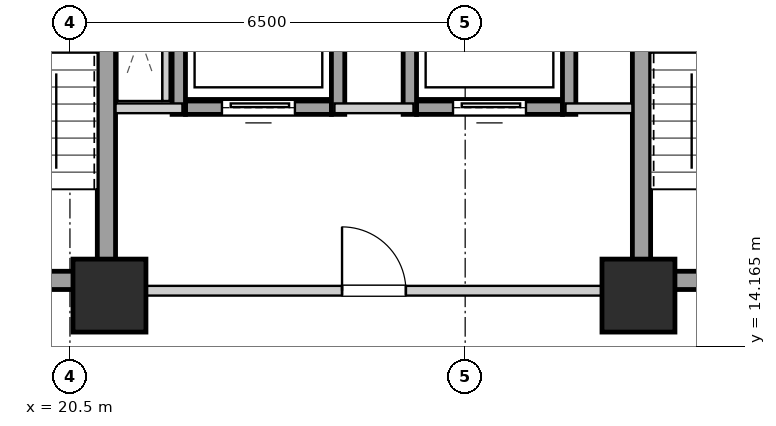
"""IFC4 building model, lengths in metres.
Left out: names, types, materials, properties, quantities, classifications, styles, units other than length and angle.
Written with IfcOpenShell. Run it as: python <this file> out.ifc"""

import sys

from ifc_helpers import new_model, si_unit, direction, frame, frame_2d, origin, origin_2d, place, context, subcontext, project, spatial, rectangle, extrude, element, fill, save


model = new_model("IFC4")
c1 = context("Model", 3, precision=1e-05, world=origin(), true_north=direction((0.0, 1.0)))
c2 = subcontext(c1, "Body", "Model", "MODEL_VIEW")
j1 = project(units=[si_unit("LENGTHUNIT", "METRE"), si_unit("PLANEANGLEUNIT", "RADIAN")], contexts=[c1])
p1 = place(None, origin())
s1 = spatial("IfcSite", under=j1, at=p1, CompositionType="ELEMENT")
p2 = place(p1, origin())
s2 = spatial("IfcBuilding", under=s1, at=p2, CompositionType="ELEMENT")
p3 = place(p2, frame((0.0, 0.0, 25.8)))
s3 = spatial("IfcBuildingStorey", under=s2, at=p3, CompositionType="ELEMENT", Elevation=25.8)
for number, where, z_axis, x_axis in (
    (1, (21.15, 15.0, 0.0), (0.0, 0.0, 1.0), (1.0, 0.0, 0.0)),
    (2, (29.85, 15.0, 0.0), (0.0, 0.0, 1.0), (1.0, 0.0, 0.0)),
):
    element("IfcColumn", number, at=place(p3, frame(where, z_axis=z_axis, x_axis=x_axis)), inside=s3, PredefinedType="COLUMN", context=c2, shape_type="SweptSolid", body=[
        extrude(rectangle(XDim=1.2, YDim=1.2, at=origin_2d()), origin(), (0.0, 0.0, 1.0), 3.2),
    ])
p4 = place(p3, frame((21.1, 15.1, 0.0), z_axis=(0.0, 0.0, 1.0), x_axis=(0.0, 1.0, 0.0)))
e3 = element("IfcWall", 3, at=p4, inside=s3, PredefinedType="SHEAR", context=c2, shape_type="SweptSolid", body=[
    extrude(rectangle(XDim=9.0, YDim=0.3, at=frame_2d((4.5, 0.0))), origin(), (0.0, 0.0, 1.0), 2.94),
])
p5 = place(p3, frame((18.1, 15.25, 0.0), z_axis=(0.0, 0.0, 1.0), x_axis=(1.0, 0.0, 0.0)))
e4 = element("IfcWall", 4, at=p5, inside=s3, PredefinedType="SHEAR", context=c2, shape_type="SweptSolid", body=[
    extrude(rectangle(XDim=2.85, YDim=0.3, at=frame_2d((1.425, 0.0))), origin(), (0.0, 0.0, 1.0), 2.94),
])
p6 = place(p5, frame((0.86, 0.0, 0.0)))
e5 = element("IfcOpeningElement", 5, at=p6, cuts=e4, PredefinedType="OPENING", context=c2, shape_type="SweptSolid", body=[
    extrude(rectangle(XDim=1.1, YDim=2.05, at=frame_2d((0.55, 1.025))), frame((0.0, 0.16, 0.0), z_axis=(0.0, -1.0, 0.0), x_axis=(1.0, 0.0, 0.0)), (0.0, 0.0, 1.0), 0.32),
])
p7 = place(p3, frame((29.9, 15.1, 0.0), z_axis=(0.0, 0.0, 1.0), x_axis=(0.0, 1.0, 0.0)))
e6 = element("IfcWall", 6, at=p7, inside=s3, PredefinedType="SHEAR", context=c2, shape_type="SweptSolid", body=[
    extrude(rectangle(XDim=9.0, YDim=0.3, at=frame_2d((4.5, 0.0))), origin(), (0.0, 0.0, 1.0), 2.94),
])
p8 = place(p3, frame((30.05, 15.25, 0.0), z_axis=(0.0, 0.0, 1.0), x_axis=(1.0, 0.0, 0.0)))
e7 = element("IfcWall", 7, at=p8, inside=s3, PredefinedType="SHEAR", context=c2, shape_type="SweptSolid", body=[
    extrude(rectangle(XDim=2.85, YDim=0.3, at=frame_2d((1.425, 0.0))), origin(), (0.0, 0.0, 1.0), 2.94),
])
p9 = place(p8, frame((0.86, 0.0, 0.0)))
e8 = element("IfcOpeningElement", 8, at=p9, cuts=e7, PredefinedType="OPENING", context=c2, shape_type="SweptSolid", body=[
    extrude(rectangle(XDim=1.1, YDim=2.05, at=frame_2d((0.55, 1.025))), frame((0.0, 0.16, 0.0), z_axis=(0.0, -1.0, 0.0), x_axis=(1.0, 0.0, 0.0)), (0.0, 0.0, 1.0), 0.32),
])
p10 = place(p3, frame((22.4, 18.09, 0.0), z_axis=(0.0, 0.0, 1.0), x_axis=(1.0, 0.0, 0.0)))
e9 = element("IfcWall", 9, at=p10, inside=s3, PredefinedType="SHEAR", context=c2, shape_type="SweptSolid", body=[
    extrude(rectangle(XDim=2.4, YDim=0.22, at=frame_2d((1.2, 0.0))), origin(), (0.0, 0.0, 1.0), 2.94),
])
p11 = place(p10, frame((0.6, 0.0, 0.0)))
e10 = element("IfcOpeningElement", 10, at=p11, cuts=e9, PredefinedType="OPENING", context=c2, shape_type="SweptSolid", body=[
    extrude(rectangle(XDim=1.2, YDim=2.15, at=frame_2d((0.6, 1.075))), frame((0.0, 0.12, 0.0), z_axis=(0.0, -1.0, 0.0), x_axis=(1.0, 0.0, 0.0)), (0.0, 0.0, 1.0), 0.24),
])
for number, where, z_axis, x_axis in (
    (11, (22.29, 17.98, 0.0), (0.0, 0.0, 1.0), (0.0, 1.0, 0.0)),
    (12, (24.91, 17.98, 0.0), (0.0, 0.0, 1.0), (0.0, 1.0, 0.0)),
):
    element("IfcWall", number, at=place(p3, frame(where, z_axis=z_axis, x_axis=x_axis)), inside=s3, PredefinedType="SHEAR", context=c2, shape_type="SweptSolid", body=[
        extrude(rectangle(XDim=2.54, YDim=0.22, at=frame_2d((1.27, 0.0))), origin(), (0.0, 0.0, 1.0), 2.94),
    ])
p12 = place(p3, frame((26.2, 18.09, 0.0), z_axis=(0.0, 0.0, 1.0), x_axis=(1.0, 0.0, 0.0)))
e13 = element("IfcWall", 13, at=p12, inside=s3, PredefinedType="SHEAR", context=c2, shape_type="SweptSolid", body=[
    extrude(rectangle(XDim=2.4, YDim=0.22, at=frame_2d((1.2, 0.0))), origin(), (0.0, 0.0, 1.0), 2.94),
])
p13 = place(p12, frame((0.6, 0.0, 0.0)))
e14 = element("IfcOpeningElement", 14, at=p13, cuts=e13, PredefinedType="OPENING", context=c2, shape_type="SweptSolid", body=[
    extrude(rectangle(XDim=1.2, YDim=2.15, at=frame_2d((0.6, 1.075))), frame((0.0, 0.12, 0.0), z_axis=(0.0, -1.0, 0.0), x_axis=(1.0, 0.0, 0.0)), (0.0, 0.0, 1.0), 0.24),
])
for number, where, z_axis, x_axis in (
    (15, (26.09, 17.98, 0.0), (0.0, 0.0, 1.0), (0.0, 1.0, 0.0)),
    (16, (28.71, 17.98, 0.0), (0.0, 0.0, 1.0), (0.0, 1.0, 0.0)),
):
    element("IfcWall", number, at=place(p3, frame(where, z_axis=z_axis, x_axis=x_axis)), inside=s3, PredefinedType="SHEAR", context=c2, shape_type="SweptSolid", body=[
        extrude(rectangle(XDim=2.54, YDim=0.22, at=frame_2d((1.27, 0.0))), origin(), (0.0, 0.0, 1.0), 2.94),
    ])
p14 = place(p3, frame((21.25, 15.08, 0.0), z_axis=(0.0, 0.0, 1.0), x_axis=(1.0, 0.0, 0.0)))
e17 = element("IfcWall", 17, at=p14, inside=s3, PredefinedType="PARTITIONING", context=c2, shape_type="SweptSolid", body=[
    extrude(rectangle(XDim=8.5, YDim=0.16, at=frame_2d((4.25, 0.0))), origin(), (0.0, 0.0, 1.0), 2.155),
])
p15 = place(p14, frame((3.725, 0.0, 0.0)))
e18 = element("IfcOpeningElement", 18, at=p15, cuts=e17, PredefinedType="OPENING", context=c2, shape_type="SweptSolid", body=[
    extrude(rectangle(XDim=1.05, YDim=2.05, at=frame_2d((0.525, 1.025))), frame((0.0, 0.09, 0.0), z_axis=(0.0, -1.0, 0.0), x_axis=(1.0, 0.0, 0.0)), (0.0, 0.0, 1.0), 0.18),
])
p16 = place(p3, frame((21.25, 18.08, 0.0), z_axis=(0.0, 0.0, 1.0), x_axis=(1.0, 0.0, 0.0)))
e19 = element("IfcWall", 19, at=p16, inside=s3, PredefinedType="PARTITIONING", context=c2, shape_type="SweptSolid", body=[
    extrude(rectangle(XDim=1.1, YDim=0.16, at=frame_2d((0.55, 0.0))), origin(), (0.0, 0.0, 1.0), 2.94),
])
p17 = place(p3, frame((24.85, 18.08, 0.0), z_axis=(0.0, 0.0, 1.0), x_axis=(1.0, 0.0, 0.0)))
e20 = element("IfcWall", 20, at=p17, inside=s3, PredefinedType="PARTITIONING", context=c2, shape_type="SweptSolid", body=[
    extrude(rectangle(XDim=1.3, YDim=0.16, at=frame_2d((0.65, 0.0))), origin(), (0.0, 0.0, 1.0), 2.94),
])
p18 = place(p3, frame((28.65, 18.08, 0.0), z_axis=(0.0, 0.0, 1.0), x_axis=(1.0, 0.0, 0.0)))
e21 = element("IfcWall", 21, at=p18, inside=s3, PredefinedType="PARTITIONING", context=c2, shape_type="SweptSolid", body=[
    extrude(rectangle(XDim=1.1, YDim=0.16, at=frame_2d((0.55, 0.0))), origin(), (0.0, 0.0, 1.0), 2.94),
])
p19 = place(p3, frame((22.08, 18.2, 0.0), z_axis=(0.0, 0.0, 1.0), x_axis=(0.0, 1.0, 0.0)))
e22 = element("IfcWall", 22, at=p19, inside=s3, PredefinedType="PARTITIONING", context=c2, shape_type="SweptSolid", body=[
    extrude(rectangle(XDim=2.12, YDim=0.12, at=frame_2d((1.06, 0.0))), origin(), (0.0, 0.0, 1.0), 2.94),
])
p20 = place(p11, origin())
e23 = element("IfcDoor", 23, at=p20, inside=s3, OperationType="SLIDING_TO_LEFT", PredefinedType="DOOR", context=c2, shape_type="SweptSolid", body=[
    extrude(rectangle(XDim=1.2, YDim=2.15, at=frame_2d((0.6, 1.075))), frame((0.0, 0.025, 0.0), z_axis=(0.0, -1.0, 0.0), x_axis=(1.0, 0.0, 0.0)), (0.0, 0.0, 1.0), 0.05),
])
fill(e10, e23)
p21 = place(p13, origin())
e24 = element("IfcDoor", 24, at=p21, inside=s3, OperationType="SLIDING_TO_LEFT", PredefinedType="DOOR", context=c2, shape_type="SweptSolid", body=[
    extrude(rectangle(XDim=1.2, YDim=2.15, at=frame_2d((0.6, 1.075))), frame((0.0, 0.025, 0.0), z_axis=(0.0, -1.0, 0.0), x_axis=(1.0, 0.0, 0.0)), (0.0, 0.0, 1.0), 0.05),
])
fill(e14, e24)
p22 = place(p15, origin())
e25 = element("IfcDoor", 25, at=p22, inside=s3, OperationType="SINGLE_SWING_LEFT", PredefinedType="DOOR", context=c2, shape_type="SweptSolid", body=[
    extrude(rectangle(XDim=1.05, YDim=2.05, at=frame_2d((0.525, 1.025))), frame((0.0, 0.025, 0.0), z_axis=(0.0, -1.0, 0.0), x_axis=(1.0, 0.0, 0.0)), (0.0, 0.0, 1.0), 0.05),
])
fill(e18, e25)
save(model, sys.argv[1])
